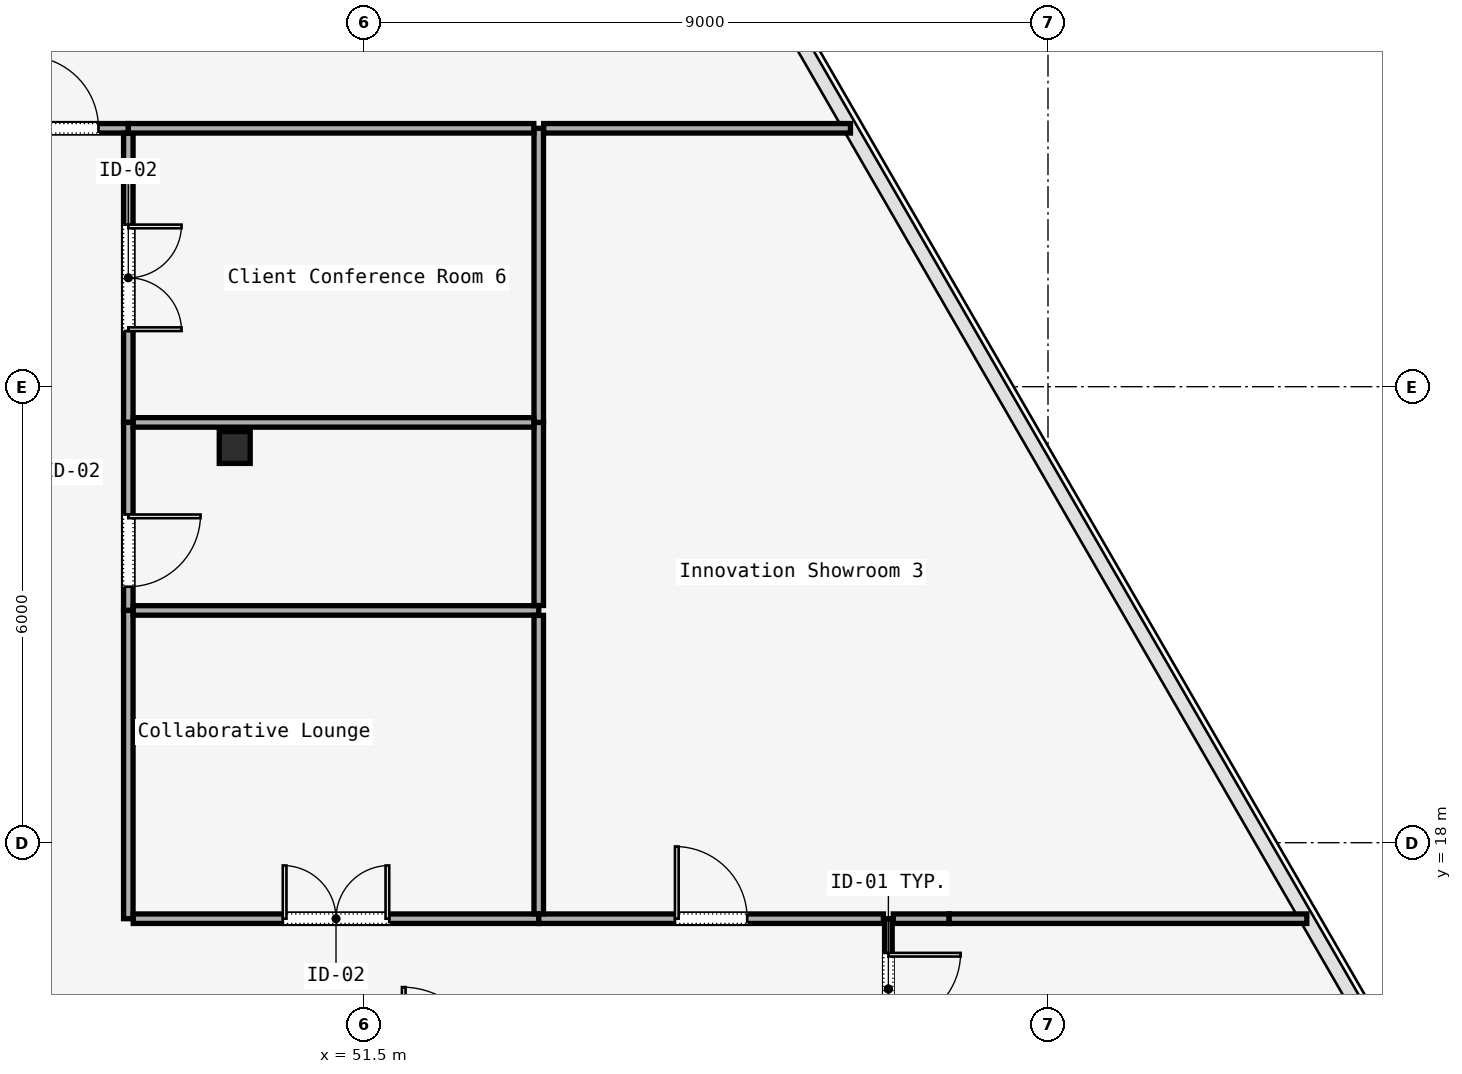
"""IFC4 building model, lengths in metres.
Left out: names, types, materials, properties, quantities, classifications, styles, units other than length and angle.
Written with IfcOpenShell. Run it as: python <this file> out.ifc"""

import sys

from ifc_helpers import new_model, si_unit, direction, frame, frame_2d, origin, origin_2d, place, context, subcontext, project, spatial, rectangle, i_section, extrude, element, fill, save


model = new_model("IFC4")
c1 = context("Model", 3, precision=1e-05, world=origin(), true_north=direction((0.0, 1.0)))
c2 = subcontext(c1, "Body", "Model", "MODEL_VIEW")
j1 = project(units=[si_unit("LENGTHUNIT", "METRE"), si_unit("PLANEANGLEUNIT", "RADIAN")], contexts=[c1])
p1 = place(None, origin())
s1 = spatial("IfcSite", under=j1, at=p1, CompositionType="ELEMENT")
p2 = place(p1, origin())
s2 = spatial("IfcBuilding", under=s1, at=p2, CompositionType="ELEMENT")
p3 = place(p2, frame((0.0, 0.0, 180.2)))
s3 = spatial("IfcBuildingStorey", under=s2, at=p3, CompositionType="ELEMENT", Elevation=180.2)
p4 = place(p3, frame((49.8, 23.2, 0.0), z_axis=(0.0, 0.0, 1.0), x_axis=(1.0, 0.0, 0.0)))
e1 = element("IfcColumn", 1, at=p4, inside=s3, PredefinedType="COLUMN", context=c2, shape_type="SweptSolid", body=[
    extrude(i_section(OverallWidth=0.407, OverallDepth=0.419, WebThickness=0.031, FlangeThickness=0.049, FilletRadius=0.015, at=origin_2d()), origin(), (0.0, 0.0, 1.0), 3.58),
])
p5 = place(p3, frame((58.4, 17.0, 0.0), z_axis=(0.0, 0.0, 1.0), x_axis=(0.0, -1.0, 0.0)))
e2 = element("IfcWall", 2, at=p5, inside=s3, PredefinedType="MOVABLE", context=c2, shape_type="SweptSolid", body=[
    extrude(rectangle(XDim=1.85, YDim=0.1, at=frame_2d((0.925, 0.0))), origin(), (0.0, 0.0, 1.0), 3.01),
])
p6 = place(p5, frame((0.45, 0.0, 0.0)))
e3 = element("IfcOpeningElement", 3, at=p6, cuts=e2, PredefinedType="OPENING", context=c2, shape_type="SweptSolid", body=[
    extrude(rectangle(XDim=0.95, YDim=2.2, at=frame_2d((0.475, 1.1))), frame((0.0, 0.05, 0.0), z_axis=(0.0, -1.0, 0.0), x_axis=(1.0, 0.0, 0.0)), (0.0, 0.0, 1.0), 0.1),
])
p7 = place(p3, frame((46.665, 27.4, 0.0), z_axis=(0.0, 0.0, 1.0), x_axis=(1.0, 0.0, 0.0)))
e4 = element("IfcWall", 4, at=p7, inside=s3, PredefinedType="PARTITIONING", context=c2, shape_type="SweptSolid", body=[
    extrude(rectangle(XDim=1.735, YDim=0.125, at=frame_2d((0.867, 0.0))), origin(), (0.0, 0.0, 1.0), 3.01),
])
p8 = place(p7, frame((0.393, 0.0, 0.0)))
e5 = element("IfcOpeningElement", 5, at=p8, cuts=e4, PredefinedType="OPENING", context=c2, shape_type="SweptSolid", body=[
    extrude(rectangle(XDim=0.95, YDim=2.2, at=frame_2d((0.475, 1.1))), frame((0.0, 0.062, 0.0), z_axis=(0.0, -1.0, 0.0), x_axis=(1.0, 0.0, 0.0)), (0.0, 0.0, 1.0), 0.125),
])
p9 = place(p3, frame((48.4, 27.335, 0.0), z_axis=(0.0, 0.0, 1.0), x_axis=(0.0, -1.0, 0.0)))
e6 = element("IfcWall", 6, at=p9, inside=s3, PredefinedType="PARTITIONING", context=c2, shape_type="SweptSolid", body=[
    extrude(rectangle(XDim=3.805, YDim=0.125, at=frame_2d((1.902, 0.0))), origin(), (0.0, 0.0, 1.0), 3.01),
])
p10 = place(p9, frame((1.202, 0.0, 0.0)))
e7 = element("IfcOpeningElement", 7, at=p10, cuts=e6, PredefinedType="OPENING", context=c2, shape_type="SweptSolid", body=[
    extrude(rectangle(XDim=1.4, YDim=2.2, at=frame_2d((0.7, 1.1))), frame((0.0, 0.062, 0.0), z_axis=(0.0, -1.0, 0.0), x_axis=(1.0, 0.0, 0.0)), (0.0, 0.0, 1.0), 0.125),
])
p11 = place(p3, frame((48.4, 23.53, 0.0), z_axis=(0.0, 0.0, 1.0), x_axis=(0.0, -1.0, 0.0)))
e8 = element("IfcWall", 8, at=p11, inside=s3, PredefinedType="PARTITIONING", context=c2, shape_type="SweptSolid", body=[
    extrude(rectangle(XDim=2.474, YDim=0.125, at=frame_2d((1.237, 0.0))), origin(), (0.0, 0.0, 1.0), 3.01),
])
p12 = place(p11, frame((1.212, 0.0, 0.0)))
e9 = element("IfcOpeningElement", 9, at=p12, cuts=e8, PredefinedType="OPENING", context=c2, shape_type="SweptSolid", body=[
    extrude(rectangle(XDim=0.95, YDim=2.2, at=frame_2d((0.475, 1.1))), frame((0.0, 0.062, 0.0), z_axis=(0.0, -1.0, 0.0), x_axis=(1.0, 0.0, 0.0)), (0.0, 0.0, 1.0), 0.125),
])
p13 = place(p3, frame((48.4, 21.056, 0.0), z_axis=(0.0, 0.0, 1.0), x_axis=(0.0, -1.0, 0.0)))
e10 = element("IfcWall", 10, at=p13, inside=s3, PredefinedType="PARTITIONING", context=c2, shape_type="SweptSolid", body=[
    extrude(rectangle(XDim=4.056, YDim=0.125, at=frame_2d((2.028, 0.0))), origin(), (0.0, 0.0, 1.0), 3.01),
])
p14 = place(p3, frame((48.465, 17.0, 0.0), z_axis=(0.0, 0.0, 1.0), x_axis=(1.0, 0.0, 0.0)))
e11 = element("IfcWall", 11, at=p14, inside=s3, PredefinedType="PARTITIONING", context=c2, shape_type="SweptSolid", body=[
    extrude(rectangle(XDim=5.335, YDim=0.125, at=frame_2d((2.667, 0.0))), origin(), (0.0, 0.0, 1.0), 3.01),
])
p15 = place(p14, frame((1.968, 0.0, 0.0)))
e12 = element("IfcOpeningElement", 12, at=p15, cuts=e11, PredefinedType="OPENING", context=c2, shape_type="SweptSolid", body=[
    extrude(rectangle(XDim=1.4, YDim=2.2, at=frame_2d((0.7, 1.1))), frame((0.0, 0.062, 0.0), z_axis=(0.0, -1.0, 0.0), x_axis=(1.0, 0.0, 0.0)), (0.0, 0.0, 1.0), 0.125),
])
p16 = place(p3, frame((53.8, 17.0, 0.0), z_axis=(0.0, 0.0, 1.0), x_axis=(1.0, 0.0, 0.0)))
e13 = element("IfcWall", 13, at=p16, inside=s3, PredefinedType="PARTITIONING", context=c2, shape_type="SweptSolid", body=[
    extrude(rectangle(XDim=4.535, YDim=0.125, at=frame_2d((2.268, 0.0))), origin(), (0.0, 0.0, 1.0), 3.01),
])
p17 = place(p16, frame((1.792, 0.0, 0.0)))
e14 = element("IfcOpeningElement", 14, at=p17, cuts=e13, PredefinedType="OPENING", context=c2, shape_type="SweptSolid", body=[
    extrude(rectangle(XDim=0.95, YDim=2.2, at=frame_2d((0.475, 1.1))), frame((0.0, 0.062, 0.0), z_axis=(0.0, -1.0, 0.0), x_axis=(1.0, 0.0, 0.0)), (0.0, 0.0, 1.0), 0.125),
])
p18 = place(p3, frame((58.465, 17.0, 0.0), z_axis=(0.0, 0.0, 1.0), x_axis=(1.0, 0.0, 0.0)))
e15 = element("IfcWall", 15, at=p18, inside=s3, PredefinedType="PARTITIONING", context=c2, shape_type="SweptSolid", body=[
    extrude(rectangle(XDim=0.735, YDim=0.125, at=frame_2d((0.367, 0.0))), origin(), (0.0, 0.0, 1.0), 3.01),
])
p19 = place(p3, frame((59.2, 17.0, 0.0), z_axis=(0.0, 0.0, 1.0), x_axis=(1.0, 0.0, 0.0)))
e16 = element("IfcWall", 16, at=p19, inside=s3, PredefinedType="PARTITIONING", context=c2, shape_type="SweptSolid", body=[
    extrude(rectangle(XDim=4.705, YDim=0.125, at=frame_2d((2.353, 0.0))), origin(), (0.0, 0.0, 1.0), 3.01),
])
p20 = place(p3, frame((48.465, 21.056, 0.0), z_axis=(0.0, 0.0, 1.0), x_axis=(1.0, 0.0, 0.0)))
e17 = element("IfcWall", 17, at=p20, inside=s3, PredefinedType="PARTITIONING", context=c2, shape_type="SweptSolid", body=[
    extrude(rectangle(XDim=5.335, YDim=0.125, at=frame_2d((2.667, 0.0))), origin(), (0.0, 0.0, 1.0), 3.01),
])
p21 = place(p3, frame((53.8, 20.991, 0.0), z_axis=(0.0, 0.0, 1.0), x_axis=(0.0, -1.0, 0.0)))
e18 = element("IfcWall", 18, at=p21, inside=s3, PredefinedType="PARTITIONING", context=c2, shape_type="SweptSolid", body=[
    extrude(rectangle(XDim=3.926, YDim=0.125, at=frame_2d((1.963, 0.0))), origin(), (0.0, 0.0, 1.0), 3.01),
])
p22 = place(p3, frame((53.8, 21.121, 0.0), z_axis=(0.0, 0.0, 1.0), x_axis=(0.0, 1.0, 0.0)))
e19 = element("IfcWall", 19, at=p22, inside=s3, PredefinedType="PARTITIONING", context=c2, shape_type="SweptSolid", body=[
    extrude(rectangle(XDim=2.409, YDim=0.125, at=frame_2d((1.205, 0.0))), origin(), (0.0, 0.0, 1.0), 3.01),
])
p23 = place(p3, frame((53.8, 23.53, 0.0), z_axis=(0.0, 0.0, 1.0), x_axis=(0.0, 1.0, 0.0)))
e20 = element("IfcWall", 20, at=p23, inside=s3, PredefinedType="PARTITIONING", context=c2, shape_type="SweptSolid", body=[
    extrude(rectangle(XDim=3.87, YDim=0.125, at=frame_2d((1.935, 0.0))), origin(), (0.0, 0.0, 1.0), 3.01),
])
p24 = place(p3, frame((53.865, 27.4, 0.0), z_axis=(0.0, 0.0, 1.0), x_axis=(1.0, 0.0, 0.0)))
e21 = element("IfcWall", 21, at=p24, inside=s3, PredefinedType="PARTITIONING", context=c2, shape_type="SweptSolid", body=[
    extrude(rectangle(XDim=4.036, YDim=0.125, at=frame_2d((2.018, 0.0))), origin(), (0.0, 0.0, 1.0), 3.01),
])
p25 = place(p3, frame((48.465, 23.53, 0.0), z_axis=(0.0, 0.0, 1.0), x_axis=(1.0, 0.0, 0.0)))
e22 = element("IfcWall", 22, at=p25, inside=s3, PredefinedType="PARTITIONING", context=c2, shape_type="SweptSolid", body=[
    extrude(rectangle(XDim=5.27, YDim=0.125, at=frame_2d((2.635, 0.0))), origin(), (0.0, 0.0, 1.0), 3.01),
])
p26 = place(p3, frame((48.4, 27.4, 0.0), z_axis=(0.0, 0.0, 1.0), x_axis=(1.0, 0.0, 0.0)))
e23 = element("IfcWall", 23, at=p26, inside=s3, PredefinedType="PARTITIONING", context=c2, shape_type="SweptSolid", body=[
    extrude(rectangle(XDim=5.335, YDim=0.125, at=frame_2d((2.667, 0.0))), origin(), (0.0, 0.0, 1.0), 3.01),
])
p27 = place(p6, origin())
e24 = element("IfcDoor", 24, at=p27, inside=s3, OperationType="SINGLE_SWING_LEFT", PredefinedType="DOOR", context=c2, shape_type="SweptSolid", body=[
    extrude(rectangle(XDim=0.95, YDim=2.2, at=frame_2d((0.475, 1.1))), frame((0.0, 0.025, 0.0), z_axis=(0.0, -1.0, 0.0), x_axis=(1.0, 0.0, 0.0)), (0.0, 0.0, 1.0), 0.05),
])
fill(e3, e24)
p28 = place(p15, origin())
e25 = element("IfcDoor", 25, at=p28, inside=s3, OperationType="SINGLE_SWING_RIGHT", PredefinedType="DOOR", context=c2, shape_type="SweptSolid", body=[
    extrude(rectangle(XDim=1.4, YDim=2.2, at=frame_2d((0.7, 1.1))), frame((0.0, 0.025, 0.0), z_axis=(0.0, -1.0, 0.0), x_axis=(1.0, 0.0, 0.0)), (0.0, 0.0, 1.0), 0.05),
])
fill(e12, e25)
p29 = place(p17, origin())
e26 = element("IfcDoor", 26, at=p29, inside=s3, OperationType="SINGLE_SWING_RIGHT", PredefinedType="DOOR", context=c2, shape_type="SweptSolid", body=[
    extrude(rectangle(XDim=0.95, YDim=2.2, at=frame_2d((0.475, 1.1))), frame((0.0, 0.025, 0.0), z_axis=(0.0, -1.0, 0.0), x_axis=(1.0, 0.0, 0.0)), (0.0, 0.0, 1.0), 0.05),
])
fill(e14, e26)
p30 = place(p12, origin())
e27 = element("IfcDoor", 27, at=p30, inside=s3, OperationType="SINGLE_SWING_LEFT", PredefinedType="DOOR", context=c2, shape_type="SweptSolid", body=[
    extrude(rectangle(XDim=0.95, YDim=2.2, at=frame_2d((0.475, 1.1))), frame((0.0, 0.025, 0.0), z_axis=(0.0, -1.0, 0.0), x_axis=(1.0, 0.0, 0.0)), (0.0, 0.0, 1.0), 0.05),
])
fill(e9, e27)
p31 = place(p10, origin())
e28 = element("IfcDoor", 28, at=p31, inside=s3, OperationType="SINGLE_SWING_LEFT", PredefinedType="DOOR", context=c2, shape_type="SweptSolid", body=[
    extrude(rectangle(XDim=1.4, YDim=2.2, at=frame_2d((0.7, 1.1))), frame((0.0, 0.025, 0.0), z_axis=(0.0, -1.0, 0.0), x_axis=(1.0, 0.0, 0.0)), (0.0, 0.0, 1.0), 0.05),
])
fill(e7, e28)
p32 = place(p8, origin())
e29 = element("IfcDoor", 29, at=p32, inside=s3, OperationType="SINGLE_SWING_LEFT", PredefinedType="DOOR", context=c2, shape_type="SweptSolid", body=[
    extrude(rectangle(XDim=0.95, YDim=2.2, at=frame_2d((0.475, 1.1))), frame((0.0, 0.025, 0.0), z_axis=(0.0, -1.0, 0.0), x_axis=(1.0, 0.0, 0.0)), (0.0, 0.0, 1.0), 0.05),
])
fill(e5, e29)
save(model, sys.argv[1])
